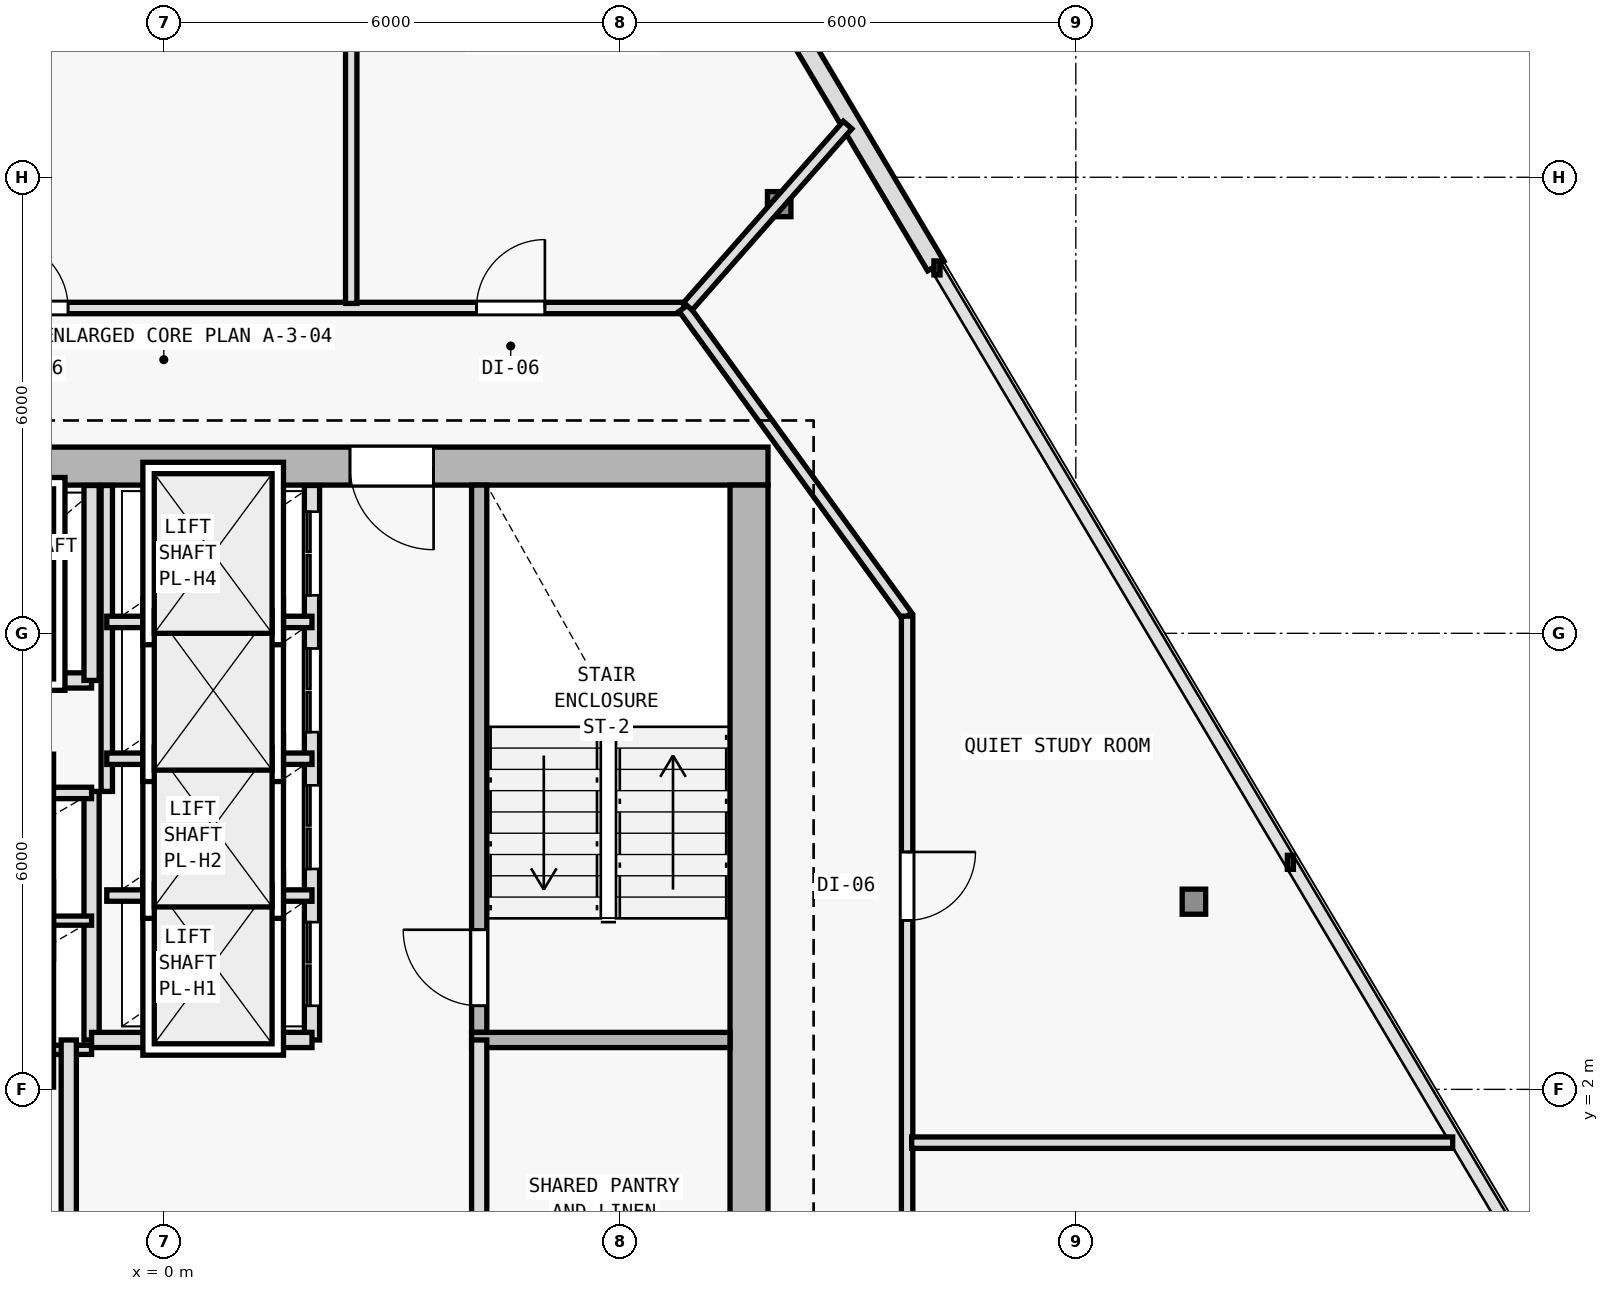
"""IFC4 building model, lengths in metres.
Left out: names, types, materials, properties, quantities, classifications, styles, units other than length and angle.
Written with IfcOpenShell. Run it as: python <this file> out.ifc"""

import sys

from ifc_helpers import new_model, si_unit, direction, frame, frame_2d, origin, origin_2d, place, context, subcontext, project, spatial, rectangle, i_section, extrude, element, fill, save


model = new_model("IFC4")
c1 = context("Model", 3, precision=1e-05, world=origin(), true_north=direction((0.0, 1.0)))
c2 = subcontext(c1, "Body", "Model", "MODEL_VIEW")
j1 = project(units=[si_unit("LENGTHUNIT", "METRE"), si_unit("PLANEANGLEUNIT", "RADIAN")], contexts=[c1])
p1 = place(None, origin())
s1 = spatial("IfcSite", under=j1, at=p1, CompositionType="ELEMENT")
p2 = place(p1, origin())
s2 = spatial("IfcBuilding", under=s1, at=p2, CompositionType="ELEMENT")
p3 = place(p2, frame((0.0, 0.0, 272.4)))
s3 = spatial("IfcBuildingStorey", under=s2, at=p3, CompositionType="ELEMENT", Elevation=272.4)
for number, where, z_axis, x_axis in (
    (1, (7.7, 10.2, 0.0), (0.0, 0.0, 1.0), (1.0, 0.0, 0.0)),
    (2, (7.7, 0.4, 0.0), (0.0, 0.0, 1.0), (1.0, 0.0, 0.0)),
):
    element("IfcColumn", number, at=place(p3, frame(where, z_axis=z_axis, x_axis=x_axis)), inside=s3, PredefinedType="COLUMN", context=c2, shape_type="SweptSolid", body=[
        extrude(i_section(OverallWidth=0.374, OverallDepth=0.372, WebThickness=0.012, FlangeThickness=0.02, FilletRadius=0.015, at=origin_2d()), origin(), (0.0, 0.0, 1.0), 3.6),
    ])
p4 = place(p3, frame((13.554, 4.469, 0.006), z_axis=(-0.018907326549, 0.00952167524, 0.999775900241), x_axis=(-0.449781931574, -0.893138406984, 0.0)))
e3 = element("IfcColumn", 3, at=p4, inside=s3, PredefinedType="COLUMN", context=c2, shape_type="SweptSolid", body=[
    extrude(i_section(OverallWidth=0.309, OverallDepth=0.33, WebThickness=0.011, FlangeThickness=0.019, FilletRadius=0.027, at=origin_2d()), origin(), (0.0, 0.0, 1.0), 3.59),
])
p5 = place(p3, frame((8.097, 13.646, 0.006), z_axis=(-0.011767855299, -0.002516824544, 0.999927588966), x_axis=(0.209143047003, -0.977885057607, 0.0)))
e4 = element("IfcColumn", 4, at=p5, inside=s3, PredefinedType="COLUMN", context=c2, shape_type="SweptSolid", body=[
    extrude(i_section(OverallWidth=0.309, OverallDepth=0.33, WebThickness=0.011, FlangeThickness=0.019, FilletRadius=0.027, at=origin_2d()), origin(), (0.0, 0.0, 1.0), 3.589),
])
p6 = place(p3, frame((5.24, 21.103, 0.0), z_axis=(0.0, 0.0, 1.0), x_axis=(0.511088566076, -0.859528055171, 0.0)))
e5 = element("IfcWall", 5, at=p6, inside=s3, PredefinedType="SOLIDWALL", context=c2, shape_type="SweptSolid", body=[
    extrude(rectangle(XDim=9.622, YDim=0.25, at=frame_2d((4.811, 0.0))), origin(), (0.0, 0.0, 1.0), 3.35),
])
p7 = place(p6, frame((3.911, 0.0, 0.62)))
e6 = element("IfcOpeningElement", 6, at=p7, cuts=e5, PredefinedType="OPENING", context=c2, shape_type="SweptSolid", body=[
    extrude(rectangle(XDim=1.8, YDim=2.1, at=frame_2d((0.9, 1.05))), frame((0.0, 0.135, 0.0), z_axis=(0.0, -1.0, 0.0), x_axis=(1.0, 0.0, 0.0)), (0.0, 0.0, 1.0), 0.27),
])
p8 = place(p3, frame((7.95, 10.2, 0.0), z_axis=(0.0, 0.0, 1.0), x_axis=(-1.0, 0.0, 0.0)))
e7 = element("IfcWall", 7, at=p8, inside=s3, PredefinedType="SHEAR", context=c2, shape_type="SweptSolid", body=[
    extrude(rectangle(XDim=15.9, YDim=0.5, at=frame_2d((7.95, 0.0))), origin(), (0.0, 0.0, 1.0), 3.35),
])
p9 = place(p8, frame((4.4, 0.0, 0.0)))
e8 = element("IfcOpeningElement", 8, at=p9, cuts=e7, PredefinedType="OPENING", context=c2, shape_type="SweptSolid", body=[
    extrude(rectangle(XDim=1.1, YDim=2.15, at=frame_2d((0.55, 1.075))), frame((0.0, 0.26, 0.0), z_axis=(0.0, -1.0, 0.0), x_axis=(1.0, 0.0, 0.0)), (0.0, 0.0, 1.0), 0.52),
])
p10 = place(p3, frame((7.7, 9.95, 0.0), z_axis=(0.0, 0.0, 1.0), x_axis=(0.0, -1.0, 0.0)))
e9 = element("IfcWall", 9, at=p10, inside=s3, PredefinedType="SHEAR", context=c2, shape_type="SweptSolid", body=[
    extrude(rectangle(XDim=19.1, YDim=0.5, at=frame_2d((9.55, 0.0))), origin(), (0.0, 0.0, 1.0), 3.35),
])
p11 = place(p3, frame((4.15, 2.75, 0.0), z_axis=(0.0, 0.0, 1.0), x_axis=(0.0, 1.0, 0.0)))
e10 = element("IfcWall", 10, at=p11, inside=s3, PredefinedType="SOLIDWALL", context=c2, shape_type="SweptSolid", body=[
    extrude(rectangle(XDim=7.2, YDim=0.2, at=frame_2d((3.6, 0.0))), origin(), (0.0, 0.0, 1.0), 3.35),
])
p12 = place(p11, frame((0.35, 0.0, 0.0)))
e11 = element("IfcOpeningElement", 11, at=p12, cuts=e10, PredefinedType="OPENING", context=c2, shape_type="SweptSolid", body=[
    extrude(rectangle(XDim=1.0, YDim=2.15, at=frame_2d((0.5, 1.075))), frame((0.0, 0.11, 0.0), z_axis=(0.0, -1.0, 0.0), x_axis=(1.0, 0.0, 0.0)), (0.0, 0.0, 1.0), 0.22),
])
p13 = place(p3, frame((4.05, 2.65, 0.0), z_axis=(0.0, 0.0, 1.0), x_axis=(1.0, 0.0, 0.0)))
e12 = element("IfcWall", 12, at=p13, inside=s3, PredefinedType="SOLIDWALL", context=c2, shape_type="SweptSolid", body=[
    extrude(rectangle(XDim=3.4, YDim=0.2, at=frame_2d((1.7, 0.0))), origin(), (0.0, 0.0, 1.0), 3.35),
])
p14 = place(p3, frame((-0.95, 2.65, 0.0), z_axis=(0.0, 0.0, 1.0), x_axis=(0.0, 1.0, 0.0)))
e13 = element("IfcWall", 13, at=p14, inside=s3, PredefinedType="SOLIDWALL", context=c2, shape_type="SweptSolid", body=[
    extrude(rectangle(XDim=3.27, YDim=0.2, at=frame_2d((1.635, 0.0))), origin(), (0.0, 0.0, 1.0), 3.35),
])
for number, where, z_axis, x_axis in (
    (14, (-3.85, 2.52, 0.0), (0.0, 0.0, 1.0), (1.0, 0.0, 0.0)),
    (15, (-3.85, 4.22, 0.0), (0.0, 0.0, 1.0), (1.0, 0.0, 0.0)),
):
    element("IfcWall", number, at=place(p3, frame(where, z_axis=z_axis, x_axis=x_axis)), inside=s3, PredefinedType="PARTITIONING", context=c2, shape_type="SweptSolid", body=[
        extrude(rectangle(XDim=2.9, YDim=0.12, at=frame_2d((1.45, 0.0))), origin(), (0.0, 0.0, 1.0), 3.35),
    ])
p15 = place(p3, frame((-3.85, 5.9, 0.0), z_axis=(0.0, 0.0, 1.0), x_axis=(1.0, 0.0, 0.0)))
e16 = element("IfcWall", 16, at=p15, inside=s3, PredefinedType="PARTITIONING", context=c2, shape_type="SweptSolid", body=[
    extrude(rectangle(XDim=2.9, YDim=0.15, at=frame_2d((1.45, 0.0))), origin(), (0.0, 0.0, 1.0), 3.35),
])
p16 = place(p3, frame((-3.85, 7.38, 0.0), z_axis=(0.0, 0.0, 1.0), x_axis=(1.0, 0.0, 0.0)))
e17 = element("IfcWall", 17, at=p16, inside=s3, PredefinedType="SOLIDWALL", context=c2, shape_type="SweptSolid", body=[
    extrude(rectangle(XDim=2.9, YDim=0.2, at=frame_2d((1.45, 0.0))), origin(), (0.0, 0.0, 1.0), 3.35),
])
p17 = place(p16, frame((0.85, 0.0, 0.0)))
e18 = element("IfcOpeningElement", 18, at=p17, cuts=e17, PredefinedType="OPENING", context=c2, shape_type="SweptSolid", body=[
    extrude(rectangle(XDim=1.2, YDim=2.2, at=frame_2d((0.6, 1.1))), frame((0.0, 0.11, 0.0), z_axis=(0.0, -1.0, 0.0), x_axis=(1.0, 0.0, 0.0)), (0.0, 0.0, 1.0), 0.22),
])
p18 = place(p3, frame((-0.95, 7.38, 0.0), z_axis=(0.0, 0.0, 1.0), x_axis=(0.0, 1.0, 0.0)))
e19 = element("IfcWall", 19, at=p18, inside=s3, PredefinedType="SOLIDWALL", context=c2, shape_type="SweptSolid", body=[
    extrude(rectangle(XDim=2.565, YDim=0.2, at=frame_2d((1.283, 0.0))), origin(), (0.0, 0.0, 1.0), 3.35),
])
p19 = place(p3, frame((4.15, -6.05, 0.0), z_axis=(0.0, 0.0, 1.0), x_axis=(0.0, 1.0, 0.0)))
e20 = element("IfcWall", 20, at=p19, inside=s3, PredefinedType="SOLIDWALL", context=c2, shape_type="SweptSolid", body=[
    extrude(rectangle(XDim=8.7, YDim=0.2, at=frame_2d((4.35, 0.0))), origin(), (0.0, 0.0, 1.0), 3.35),
])
p20 = place(p19, frame((3.6, 0.0, 0.0)))
e21 = element("IfcOpeningElement", 21, at=p20, cuts=e20, PredefinedType="OPENING", context=c2, shape_type="SweptSolid", body=[
    extrude(rectangle(XDim=0.95, YDim=2.1, at=frame_2d((0.475, 1.05))), frame((0.0, 0.11, 0.0), z_axis=(0.0, -1.0, 0.0), x_axis=(1.0, 0.0, 0.0)), (0.0, 0.0, 1.0), 0.22),
])
p21 = place(p3, frame((-1.25, -6.05, 0.0), z_axis=(0.0, 0.0, 1.0), x_axis=(0.0, 1.0, 0.0)))
e22 = element("IfcWall", 22, at=p21, inside=s3, PredefinedType="SOLIDWALL", context=c2, shape_type="SweptSolid", body=[
    extrude(rectangle(XDim=8.7, YDim=0.2, at=frame_2d((4.35, 0.0))), origin(), (0.0, 0.0, 1.0), 3.35),
])
p22 = place(p21, frame((3.4, 0.0, 0.0)))
e23 = element("IfcOpeningElement", 23, at=p22, cuts=e22, PredefinedType="OPENING", context=c2, shape_type="SweptSolid", body=[
    extrude(rectangle(XDim=0.95, YDim=2.1, at=frame_2d((0.475, 1.05))), frame((0.0, 0.11, 0.0), z_axis=(0.0, -1.0, 0.0), x_axis=(1.0, 0.0, 0.0)), (0.0, 0.0, 1.0), 0.22),
])
p23 = place(p3, frame((1.95, 2.65, 0.0), z_axis=(0.0, 0.0, 1.0), x_axis=(0.0, 1.0, 0.0)))
e24 = element("IfcWall", 24, at=p23, inside=s3, PredefinedType="SOLIDWALL", context=c2, shape_type="SweptSolid", body=[
    extrude(rectangle(XDim=7.295, YDim=0.2, at=frame_2d((3.647, 0.0))), origin(), (0.0, 0.0, 1.0), 3.35),
])
p24 = place(p23, frame((0.45, 0.0, 0.0)))
e25 = element("IfcOpeningElement", 25, at=p24, cuts=e24, PredefinedType="OPENING", context=c2, shape_type="SweptSolid", body=[
    extrude(rectangle(XDim=1.1, YDim=2.15, at=frame_2d((0.55, 1.075))), frame((0.0, 0.11, 0.0), z_axis=(0.0, -1.0, 0.0), x_axis=(1.0, 0.0, 0.0)), (0.0, 0.0, 1.0), 0.22),
])
p25 = place(p23, frame((2.25, 0.0, 0.0)))
e26 = element("IfcOpeningElement", 26, at=p25, cuts=e24, PredefinedType="OPENING", context=c2, shape_type="SweptSolid", body=[
    extrude(rectangle(XDim=1.1, YDim=2.15, at=frame_2d((0.55, 1.075))), frame((0.0, 0.11, 0.0), z_axis=(0.0, -1.0, 0.0), x_axis=(1.0, 0.0, 0.0)), (0.0, 0.0, 1.0), 0.22),
])
p26 = place(p23, frame((4.05, 0.0, 0.0)))
e27 = element("IfcOpeningElement", 27, at=p26, cuts=e24, PredefinedType="OPENING", context=c2, shape_type="SweptSolid", body=[
    extrude(rectangle(XDim=1.1, YDim=2.15, at=frame_2d((0.55, 1.075))), frame((0.0, 0.11, 0.0), z_axis=(0.0, -1.0, 0.0), x_axis=(1.0, 0.0, 0.0)), (0.0, 0.0, 1.0), 0.22),
])
p27 = place(p23, frame((5.85, 0.0, 0.0)))
e28 = element("IfcOpeningElement", 28, at=p27, cuts=e24, PredefinedType="OPENING", context=c2, shape_type="SweptSolid", body=[
    extrude(rectangle(XDim=1.1, YDim=2.15, at=frame_2d((0.55, 1.075))), frame((0.0, 0.11, 0.0), z_axis=(0.0, -1.0, 0.0), x_axis=(1.0, 0.0, 0.0)), (0.0, 0.0, 1.0), 0.22),
])
p28 = place(p3, frame((-0.95, 2.65, 0.0), z_axis=(0.0, 0.0, 1.0), x_axis=(1.0, 0.0, 0.0)))
e29 = element("IfcWall", 29, at=p28, inside=s3, PredefinedType="SOLIDWALL", context=c2, shape_type="SweptSolid", body=[
    extrude(rectangle(XDim=2.9, YDim=0.2, at=frame_2d((1.45, 0.0))), origin(), (0.0, 0.0, 1.0), 3.35),
])
p29 = place(p3, frame((-0.75, 5.92, 0.0), z_axis=(0.0, 0.0, 1.0), x_axis=(0.0, 1.0, 0.0)))
e30 = element("IfcWall", 30, at=p29, inside=s3, PredefinedType="PARTITIONING", context=c2, shape_type="SweptSolid", body=[
    extrude(rectangle(XDim=4.025, YDim=0.15, at=frame_2d((2.013, 0.0))), origin(), (0.0, 0.0, 1.0), 3.35),
])
for number, where, z_axis, x_axis in (
    (31, (-0.75, 4.55, 0.0), (0.0, 0.0, 1.0), (1.0, 0.0, 0.0)),
    (32, (-0.75, 6.35, 0.0), (0.0, 0.0, 1.0), (1.0, 0.0, 0.0)),
    (33, (-0.75, 8.15, 0.0), (0.0, 0.0, 1.0), (1.0, 0.0, 0.0)),
):
    element("IfcWall", number, at=place(p3, frame(where, z_axis=z_axis, x_axis=x_axis)), inside=s3, PredefinedType="PARTITIONING", context=c2, shape_type="SweptSolid", body=[
        extrude(rectangle(XDim=2.7, YDim=0.15, at=frame_2d((1.35, 0.0))), origin(), (0.0, 0.0, 1.0), 3.35),
    ])
p30 = place(p3, frame((-6.841, 12.28, 0.0), z_axis=(0.0, 0.0, 1.0), x_axis=(1.0, 0.0, 0.0)))
e34 = element("IfcWall", 34, at=p30, inside=s3, PredefinedType="PARTITIONING", context=c2, shape_type="SweptSolid", body=[
    extrude(rectangle(XDim=13.682, YDim=0.15, at=frame_2d((6.841, 0.0))), origin(), (0.0, 0.0, 1.0), 3.015),
])
p31 = place(p30, frame((10.955, 0.0, 0.0)))
e35 = element("IfcOpeningElement", 35, at=p31, cuts=e34, PredefinedType="OPENING", context=c2, shape_type="SweptSolid", body=[
    extrude(rectangle(XDim=0.9, YDim=2.1, at=frame_2d((0.45, 1.05))), frame((0.0, 0.085, 0.0), z_axis=(0.0, -1.0, 0.0), x_axis=(1.0, 0.0, 0.0)), (0.0, 0.0, 1.0), 0.17),
])
p32 = place(p30, frame((4.681, 0.0, 0.0)))
e36 = element("IfcOpeningElement", 36, at=p32, cuts=e34, PredefinedType="OPENING", context=c2, shape_type="SweptSolid", body=[
    extrude(rectangle(XDim=0.9, YDim=2.1, at=frame_2d((0.45, 1.05))), frame((0.0, 0.085, 0.0), z_axis=(0.0, -1.0, 0.0), x_axis=(1.0, 0.0, 0.0)), (0.0, 0.0, 1.0), 0.17),
])
p33 = place(p3, frame((6.841, 12.28, 0.0), z_axis=(0.0, 0.0, 1.0), x_axis=(0.586956386413, -0.809618552436, 0.0)))
e37 = element("IfcWall", 37, at=p33, inside=s3, PredefinedType="PARTITIONING", context=c2, shape_type="SweptSolid", body=[
    extrude(rectangle(XDim=5.008, YDim=0.15, at=frame_2d((2.504, 0.0))), origin(), (0.0, 0.0, 1.0), 3.025),
])
p34 = place(p3, frame((9.78, 8.226, 0.0), z_axis=(0.0, 0.0, 1.0), x_axis=(0.0, -1.0, 0.0)))
e38 = element("IfcWall", 38, at=p34, inside=s3, PredefinedType="PARTITIONING", context=c2, shape_type="SweptSolid", body=[
    extrude(rectangle(XDim=19.706, YDim=0.15, at=frame_2d((9.853, 0.0))), origin(), (0.0, 0.0, 1.0), 2.875),
])
p35 = place(p34, frame((17.555, 0.0, 0.0)))
e39 = element("IfcOpeningElement", 39, at=p35, cuts=e38, PredefinedType="OPENING", context=c2, shape_type="SweptSolid", body=[
    extrude(rectangle(XDim=0.9, YDim=2.1, at=frame_2d((0.45, 1.05))), frame((0.0, 0.085, 0.0), z_axis=(0.0, -1.0, 0.0), x_axis=(1.0, 0.0, 0.0)), (0.0, 0.0, 1.0), 0.17),
])
p36 = place(p34, frame((15.212, 0.0, 0.0)))
e40 = element("IfcOpeningElement", 40, at=p36, cuts=e38, PredefinedType="OPENING", context=c2, shape_type="SweptSolid", body=[
    extrude(rectangle(XDim=0.85, YDim=2.1, at=frame_2d((0.425, 1.05))), frame((0.0, 0.085, 0.0), z_axis=(0.0, -1.0, 0.0), x_axis=(1.0, 0.0, 0.0)), (0.0, 0.0, 1.0), 0.17),
])
p37 = place(p34, frame((13.378, 0.0, 0.0)))
e41 = element("IfcOpeningElement", 41, at=p37, cuts=e38, PredefinedType="OPENING", context=c2, shape_type="SweptSolid", body=[
    extrude(rectangle(XDim=0.9, YDim=2.1, at=frame_2d((0.45, 1.05))), frame((0.0, 0.085, 0.0), z_axis=(0.0, -1.0, 0.0), x_axis=(1.0, 0.0, 0.0)), (0.0, 0.0, 1.0), 0.17),
])
p38 = place(p34, frame((9.461, 0.0, 0.0)))
e42 = element("IfcOpeningElement", 42, at=p38, cuts=e38, PredefinedType="OPENING", context=c2, shape_type="SweptSolid", body=[
    extrude(rectangle(XDim=0.9, YDim=2.1, at=frame_2d((0.45, 1.05))), frame((0.0, 0.085, 0.0), z_axis=(0.0, -1.0, 0.0), x_axis=(1.0, 0.0, 0.0)), (0.0, 0.0, 1.0), 0.17),
])
p39 = place(p34, frame((3.103, 0.0, 0.0)))
e43 = element("IfcOpeningElement", 43, at=p39, cuts=e38, PredefinedType="OPENING", context=c2, shape_type="SweptSolid", body=[
    extrude(rectangle(XDim=0.9, YDim=2.1, at=frame_2d((0.45, 1.05))), frame((0.0, 0.085, 0.0), z_axis=(0.0, -1.0, 0.0), x_axis=(1.0, 0.0, 0.0)), (0.0, 0.0, 1.0), 0.17),
])
p40 = place(p3, frame((6.896, 12.302, 0.0), z_axis=(0.0, 0.0, 1.0), x_axis=(0.660915229416, 0.750460564937, 0.0)))
e44 = element("IfcWall", 44, at=p40, inside=s3, PredefinedType="PARTITIONING", context=c2, shape_type="SweptSolid", body=[
    extrude(rectangle(XDim=3.179, YDim=0.15, at=frame_2d((1.589, 0.0))), origin(), (0.0, 0.0, 1.0), 3.015),
])
p41 = place(p3, frame((2.466, 12.34, 0.0), z_axis=(0.0, 0.0, 1.0), x_axis=(0.0, 1.0, 0.0)))
e45 = element("IfcWall", 45, at=p41, inside=s3, PredefinedType="PARTITIONING", context=c2, shape_type="SweptSolid", body=[
    extrude(rectangle(XDim=7.205, YDim=0.15, at=frame_2d((3.603, 0.0))), origin(), (0.0, 0.0, 1.0), 3.015),
])
p42 = place(p3, frame((9.84, 1.299, 0.0), z_axis=(0.0, 0.0, 1.0), x_axis=(1.0, 0.0, 0.0)))
e46 = element("IfcWall", 46, at=p42, inside=s3, PredefinedType="PARTITIONING", context=c2, shape_type="SweptSolid", body=[
    extrude(rectangle(XDim=7.118, YDim=0.15, at=frame_2d((3.559, 0.0))), origin(), (0.0, 0.0, 1.0), 2.995),
])
p43 = place(p9, origin())
e47 = element("IfcDoor", 47, at=p43, inside=s3, OperationType="SINGLE_SWING_LEFT", PredefinedType="DOOR", context=c2, shape_type="SweptSolid", body=[
    extrude(rectangle(XDim=1.1, YDim=2.15, at=frame_2d((0.55, 1.075))), frame((0.0, 0.025, 0.0), z_axis=(0.0, -1.0, 0.0), x_axis=(1.0, 0.0, 0.0)), (0.0, 0.0, 1.0), 0.05),
])
fill(e8, e47)
p44 = place(p12, origin())
e48 = element("IfcDoor", 48, at=p44, inside=s3, OperationType="SINGLE_SWING_RIGHT", PredefinedType="DOOR", context=c2, shape_type="SweptSolid", body=[
    extrude(rectangle(XDim=1.0, YDim=2.15, at=frame_2d((0.5, 1.075))), frame((0.0, 0.025, 0.0), z_axis=(0.0, -1.0, 0.0), x_axis=(1.0, 0.0, 0.0)), (0.0, 0.0, 1.0), 0.05),
])
fill(e11, e48)
p45 = place(p24, origin())
e49 = element("IfcDoor", 49, at=p45, inside=s3, OperationType="DOUBLE_DOOR_SLIDING", PredefinedType="DOOR", context=c2, shape_type="SweptSolid", body=[
    extrude(rectangle(XDim=1.1, YDim=2.15, at=frame_2d((0.55, 1.075))), frame((0.0, 0.025, 0.0), z_axis=(0.0, -1.0, 0.0), x_axis=(1.0, 0.0, 0.0)), (0.0, 0.0, 1.0), 0.05),
])
fill(e25, e49)
p46 = place(p25, origin())
e50 = element("IfcDoor", 50, at=p46, inside=s3, OperationType="DOUBLE_DOOR_SLIDING", PredefinedType="DOOR", context=c2, shape_type="SweptSolid", body=[
    extrude(rectangle(XDim=1.1, YDim=2.15, at=frame_2d((0.55, 1.075))), frame((0.0, 0.025, 0.0), z_axis=(0.0, -1.0, 0.0), x_axis=(1.0, 0.0, 0.0)), (0.0, 0.0, 1.0), 0.05),
])
fill(e26, e50)
p47 = place(p26, origin())
e51 = element("IfcDoor", 51, at=p47, inside=s3, OperationType="DOUBLE_DOOR_SLIDING", PredefinedType="DOOR", context=c2, shape_type="SweptSolid", body=[
    extrude(rectangle(XDim=1.1, YDim=2.15, at=frame_2d((0.55, 1.075))), frame((0.0, 0.025, 0.0), z_axis=(0.0, -1.0, 0.0), x_axis=(1.0, 0.0, 0.0)), (0.0, 0.0, 1.0), 0.05),
])
fill(e27, e51)
p48 = place(p27, origin())
e52 = element("IfcDoor", 52, at=p48, inside=s3, OperationType="DOUBLE_DOOR_SLIDING", PredefinedType="DOOR", context=c2, shape_type="SweptSolid", body=[
    extrude(rectangle(XDim=1.1, YDim=2.15, at=frame_2d((0.55, 1.075))), frame((0.0, 0.025, 0.0), z_axis=(0.0, -1.0, 0.0), x_axis=(1.0, 0.0, 0.0)), (0.0, 0.0, 1.0), 0.05),
])
fill(e28, e52)
p49 = place(p39, origin())
e53 = element("IfcDoor", 53, at=p49, inside=s3, OperationType="SINGLE_SWING_LEFT", PredefinedType="DOOR", context=c2, shape_type="SweptSolid", body=[
    extrude(rectangle(XDim=0.9, YDim=2.1, at=frame_2d((0.45, 1.05))), frame((0.0, 0.025, 0.0), z_axis=(0.0, -1.0, 0.0), x_axis=(1.0, 0.0, 0.0)), (0.0, 0.0, 1.0), 0.05),
])
fill(e43, e53)
p50 = place(p31, origin())
e54 = element("IfcDoor", 54, at=p50, inside=s3, OperationType="SINGLE_SWING_RIGHT", PredefinedType="DOOR", context=c2, shape_type="SweptSolid", body=[
    extrude(rectangle(XDim=0.9, YDim=2.1, at=frame_2d((0.45, 1.05))), frame((0.0, 0.025, 0.0), z_axis=(0.0, -1.0, 0.0), x_axis=(1.0, 0.0, 0.0)), (0.0, 0.0, 1.0), 0.05),
])
fill(e35, e54)
p51 = place(p32, origin())
e55 = element("IfcDoor", 55, at=p51, inside=s3, OperationType="SINGLE_SWING_LEFT", PredefinedType="DOOR", context=c2, shape_type="SweptSolid", body=[
    extrude(rectangle(XDim=0.9, YDim=2.1, at=frame_2d((0.45, 1.05))), frame((0.0, 0.025, 0.0), z_axis=(0.0, -1.0, 0.0), x_axis=(1.0, 0.0, 0.0)), (0.0, 0.0, 1.0), 0.05),
])
fill(e36, e55)
save(model, sys.argv[1])
